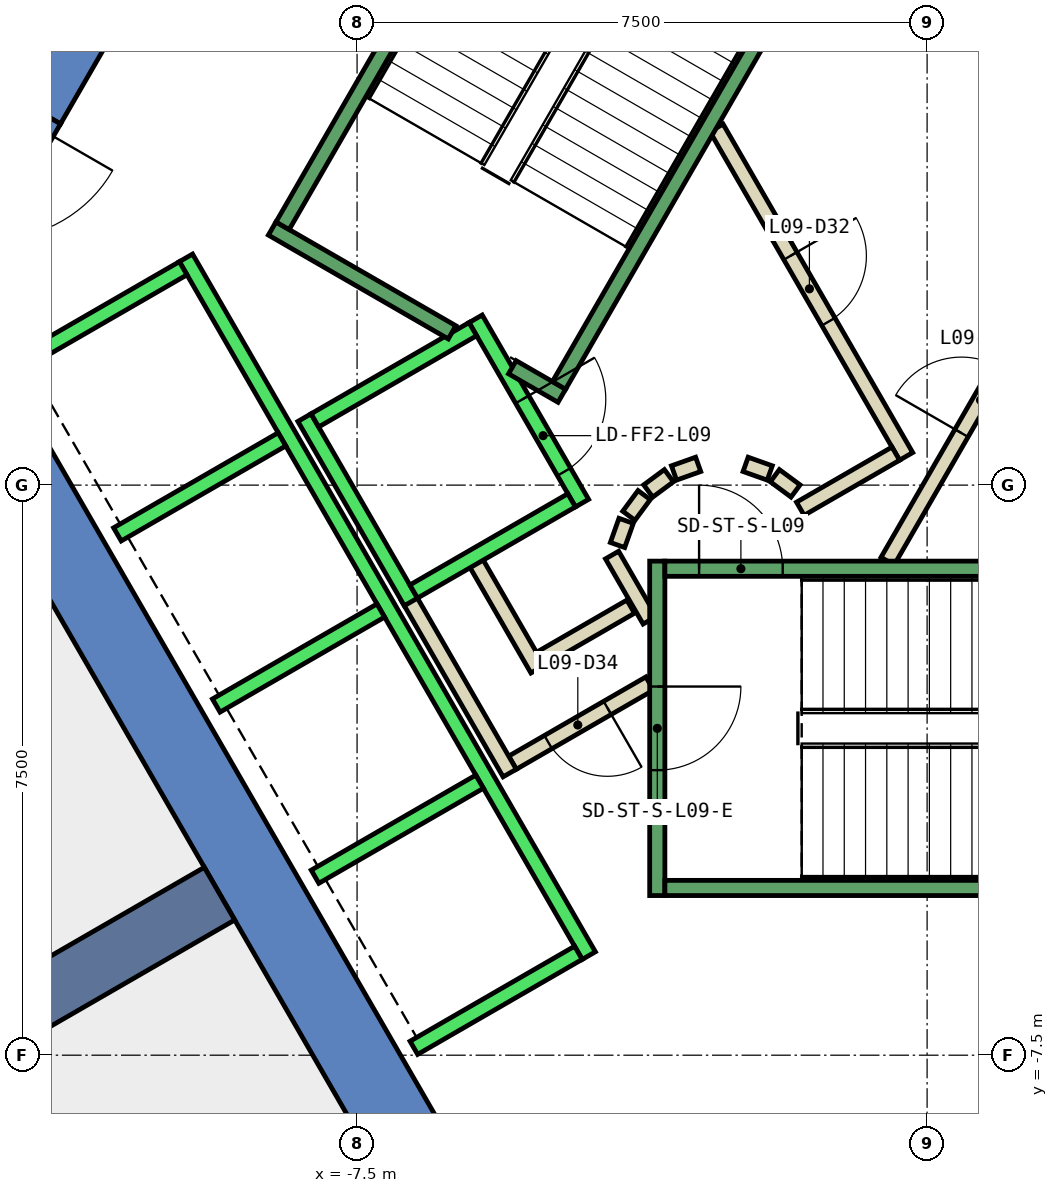
"""IFC4 building model, lengths in metres.
Left out: names, types, materials, properties, quantities, classifications, styles, units other than length and angle.
Written with IfcOpenShell. Run it as: python <this file> out.ifc"""

import sys

from ifc_helpers import new_model, si_unit, direction, frame, frame_2d, origin, place, context, subcontext, project, spatial, polyline, rectangle, outline, extrude, element, fill, save


model = new_model("IFC4")
c1 = context("Model", 3, precision=1e-05, world=origin(), true_north=direction((0.0, 1.0)))
c2 = subcontext(c1, "Body", "Model", "MODEL_VIEW")
j1 = project(units=[si_unit("LENGTHUNIT", "METRE"), si_unit("PLANEANGLEUNIT", "RADIAN")], contexts=[c1])
p1 = place(None, origin())
s1 = spatial("IfcSite", under=j1, at=p1, CompositionType="ELEMENT")
p2 = place(p1, origin())
s2 = spatial("IfcBuilding", under=s1, at=p2, CompositionType="ELEMENT")
p3 = place(p2, frame((0.0, 0.0, 47.6)))
s3 = spatial("IfcBuildingStorey", under=s2, at=p3, CompositionType="ELEMENT", Elevation=47.6)
p4 = place(p3, frame((0.0, 0.0, -0.4)))
e1 = element("IfcWall", 1, at=p4, inside=s3, PredefinedType="SHEAR", context=c2, shape_type="SweptSolid", body=[
    extrude(outline(polyline([(-12.267, 5.252), (-11.402, 4.752), (-6.351, 13.5), (-6.928, 14.5), (-12.267, 5.252)])), origin(), (0.0, 0.0, 1.0), 4.2),
])
p5 = place(p3, frame((0.0, 0.0, 3.6)))
e2 = element("IfcWall", 2, at=p5, inside=s3, PredefinedType="SHEAR", context=c2, shape_type="SweptSolid", body=[
    extrude(outline(polyline([(-13.267, 3.52), (-12.402, 3.02), (-11.402, 4.752), (-12.267, 5.252), (-13.267, 3.52)])), origin(), (0.0, 0.0, 1.0), 0.2),
])
p6 = place(p3, frame((0.0, 0.0, -0.4)))
e3 = element("IfcWall", 3, at=p6, inside=s3, PredefinedType="SHEAR", context=c2, shape_type="SweptSolid", body=[
    extrude(outline(polyline([(-13.856, 2.5), (-6.928, -9.5), (-6.351, -8.5), (-12.702, 2.5), (-13.856, 2.5)])), origin(), (0.0, 0.0, 1.0), 4.2),
])
p7 = place(p3, frame((-9.31, -5.375, -0.4), z_axis=(0.0, 0.0, 1.0), x_axis=(-0.866017533419, -0.500013631625, 0.0)))
e4 = element("IfcWall", 4, at=p7, inside=s3, PredefinedType="SHEAR", context=c2, shape_type="SweptSolid", body=[
    extrude(rectangle(XDim=9.0, YDim=0.8, at=frame_2d((4.5, 0.0))), origin(), (0.0, 0.0, 1.0), 4.2),
])
p8 = place(p3, frame((-3.9, -1.599, 0.0), z_axis=(0.0, 0.0, 1.0), x_axis=(-0.865969445389, -0.500096910261, 0.0)))
e5 = element("IfcWall", 5, at=p8, inside=s3, PredefinedType="PARTITIONING", context=c2, shape_type="SweptSolid", body=[
    extrude(rectangle(XDim=1.373, YDim=0.2, at=frame_2d((0.687, 0.0))), origin(), (0.0, 0.0, 1.0), 3.8),
])
p9 = place(p3, frame((-5.126, -2.422, 0.0), z_axis=(0.0, 0.0, 1.0), x_axis=(-0.500062241894, 0.865989465428, 0.0)))
e6 = element("IfcWall", 6, at=p9, inside=s3, PredefinedType="PARTITIONING", context=c2, shape_type="SweptSolid", body=[
    extrude(rectangle(XDim=1.7, YDim=0.2, at=frame_2d((0.85, 0.0))), origin(), (0.0, 0.0, 1.0), 3.8),
])
p10 = place(p3, frame((-3.65, -2.61, 0.0), z_axis=(0.0, 0.0, 1.0), x_axis=(-0.866072462134, -0.499918483688, 0.0)))
e7 = element("IfcWall", 7, at=p10, inside=s3, PredefinedType="PARTITIONING", context=c2, shape_type="SweptSolid", body=[
    extrude(rectangle(XDim=2.084, YDim=0.2, at=frame_2d((1.042, 0.0))), origin(), (0.0, 0.0, 1.0), 3.8),
])
p11 = place(p10, frame((0.642, 0.0, 0.0)))
e8 = element("IfcOpeningElement", 8, at=p11, cuts=e7, PredefinedType="OPENING", context=c2, shape_type="SweptSolid", body=[
    extrude(rectangle(XDim=0.9, YDim=2.1, at=frame_2d((0.45, 1.05))), frame((0.0, 0.11, 0.0), z_axis=(0.0, -1.0, 0.0), x_axis=(1.0, 0.0, 0.0)), (0.0, 0.0, 1.0), 0.22),
])
p12 = place(p3, frame((-5.492, -3.788, 0.0), z_axis=(0.0, 0.0, 1.0), x_axis=(-0.500008949224, 0.866020236886, 0.0)))
e9 = element("IfcWall", 9, at=p12, inside=s3, PredefinedType="PARTITIONING", context=c2, shape_type="SweptSolid", body=[
    extrude(rectangle(XDim=2.68, YDim=0.2, at=frame_2d((1.34, 0.0))), origin(), (0.0, 0.0, 1.0), 3.8),
])
p13 = place(p3, frame((-4.145, -0.92, 0.0), z_axis=(0.0, 0.0, 1.0), x_axis=(0.499743786207, -0.866173278362, 0.0)))
e10 = element("IfcWall", 10, at=p13, inside=s3, PredefinedType="PARTITIONING", context=c2, shape_type="SweptSolid", body=[
    extrude(rectangle(XDim=0.991, YDim=0.2, at=frame_2d((0.495, 0.0))), origin(), (0.0, 0.0, 1.0), 3.8),
])
p14 = place(p3, frame((-0.52, -1.0, 0.0), z_axis=(0.0, 0.0, 1.0), x_axis=(0.50011622646, 0.865958290007, 0.0)))
e11 = element("IfcWall", 11, at=p14, inside=s3, PredefinedType="PARTITIONING", context=c2, shape_type="SweptSolid", body=[
    extrude(rectangle(XDim=4.991, YDim=0.2, at=frame_2d((2.496, 0.0))), origin(), (0.0, 0.0, 1.0), 3.8),
])
p15 = place(p14, frame((1.945, 0.0, 0.0)))
e12 = element("IfcOpeningElement", 12, at=p15, cuts=e11, PredefinedType="OPENING", context=c2, shape_type="SweptSolid", body=[
    extrude(rectangle(XDim=1.0, YDim=2.1, at=frame_2d((0.5, 1.05))), frame((0.0, 0.11, 0.0), z_axis=(0.0, -1.0, 0.0), x_axis=(1.0, 0.0, 0.0)), (0.0, 0.0, 1.0), 0.22),
])
p16 = place(p3, frame((-2.771, 4.7, 0.0), z_axis=(0.0, 0.0, 1.0), x_axis=(0.499969479948, -0.866043023828, 0.0)))
e13 = element("IfcWall", 13, at=p16, inside=s3, PredefinedType="PARTITIONING", context=c2, shape_type="SweptSolid", body=[
    extrude(rectangle(XDim=4.99, YDim=0.2, at=frame_2d((2.495, 0.0))), origin(), (0.0, 0.0, 1.0), 3.8),
])
p17 = place(p16, frame((1.945, 0.0, 0.0)))
e14 = element("IfcOpeningElement", 14, at=p17, cuts=e13, PredefinedType="OPENING", context=c2, shape_type="SweptSolid", body=[
    extrude(rectangle(XDim=1.0, YDim=2.1, at=frame_2d((0.5, 1.05))), frame((0.0, 0.11, 0.0), z_axis=(0.0, -1.0, 0.0), x_axis=(1.0, 0.0, 0.0)), (0.0, 0.0, 1.0), 0.22),
])
p18 = place(p3, frame((-0.412, 0.414, 0.0), z_axis=(0.0, 0.0, 1.0), x_axis=(-0.866017369001, -0.500013916395, 0.0)))
e15 = element("IfcWall", 15, at=p18, inside=s3, PredefinedType="PARTITIONING", context=c2, shape_type="SweptSolid", body=[
    extrude(rectangle(XDim=1.45, YDim=0.2, at=frame_2d((0.725, 0.0))), origin(), (0.0, 0.0, 1.0), 3.8),
])
p19 = place(p3, frame((-1.731, -0.077, 0.0), z_axis=(0.0, 0.0, 1.0), x_axis=(-0.804311165252, 0.594208338422, 0.0)))
e16 = element("IfcWall", 16, at=p19, inside=s3, PredefinedType="PARTITIONING", context=c2, shape_type="SweptSolid", body=[
    extrude(rectangle(XDim=0.338, YDim=0.2, at=frame_2d((0.169, 0.0))), origin(), (0.0, 0.0, 1.0), 3.8),
])
p20 = place(p3, frame((-2.07, 0.16, 0.0), z_axis=(0.0, 0.0, 1.0), x_axis=(-0.942199461132, 0.335052496547, 0.0)))
e17 = element("IfcWall", 17, at=p20, inside=s3, PredefinedType="PARTITIONING", context=c2, shape_type="SweptSolid", body=[
    extrude(rectangle(XDim=0.337, YDim=0.2, at=frame_2d((0.169, 0.0))), origin(), (0.0, 0.0, 1.0), 3.8),
])
p21 = place(p3, frame((-3.012, 0.273, 0.0), z_axis=(0.0, 0.0, 1.0), x_axis=(-0.942280615813, -0.334824194261, 0.0)))
e18 = element("IfcWall", 18, at=p21, inside=s3, PredefinedType="PARTITIONING", context=c2, shape_type="SweptSolid", body=[
    extrude(rectangle(XDim=0.338, YDim=0.2, at=frame_2d((0.169, 0.0))), origin(), (0.0, 0.0, 1.0), 3.8),
])
p22 = place(p3, frame((-3.397, 0.124, 0.0), z_axis=(0.0, 0.0, 1.0), x_axis=(-0.804311165252, -0.594208338422, 0.0)))
e19 = element("IfcWall", 19, at=p22, inside=s3, PredefinedType="PARTITIONING", context=c2, shape_type="SweptSolid", body=[
    extrude(rectangle(XDim=0.338, YDim=0.2, at=frame_2d((0.169, 0.0))), origin(), (0.0, 0.0, 1.0), 3.8),
])
p23 = place(p3, frame((-3.723, -0.131, 0.0), z_axis=(0.0, 0.0, 1.0), x_axis=(-0.594675113454, -0.803966112121, 0.0)))
e20 = element("IfcWall", 20, at=p23, inside=s3, PredefinedType="PARTITIONING", context=c2, shape_type="SweptSolid", body=[
    extrude(rectangle(XDim=0.338, YDim=0.2, at=frame_2d((0.169, 0.0))), origin(), (0.0, 0.0, 1.0), 3.8),
])
p24 = place(p3, frame((-3.96, -0.47, 0.0), z_axis=(0.0, 0.0, 1.0), x_axis=(-0.334824194261, -0.942280615813, 0.0)))
e21 = element("IfcWall", 21, at=p24, inside=s3, PredefinedType="PARTITIONING", context=c2, shape_type="SweptSolid", body=[
    extrude(rectangle(XDim=0.338, YDim=0.2, at=frame_2d((0.169, 0.0))), origin(), (0.0, 0.0, 1.0), 3.8),
])
p25 = place(p3, frame((-5.94, 2.188, 0.0), z_axis=(0.0, 0.0, 1.0), x_axis=(0.49994636267, -0.866056369097, 0.0)))
e22 = element("IfcWall", 22, at=p25, inside=s3, PredefinedType="STANDARD", context=c2, shape_type="SweptSolid", body=[
    extrude(rectangle(XDim=2.8, YDim=0.2, at=frame_2d((1.4, 0.0))), origin(), (0.0, 0.0, 1.0), 3.8),
])
p26 = place(p25, frame((1.225, 0.0, 0.0)))
e23 = element("IfcOpeningElement", 23, at=p26, cuts=e22, PredefinedType="OPENING", context=c2, shape_type="SweptSolid", body=[
    extrude(rectangle(XDim=1.1, YDim=2.1, at=frame_2d((0.55, 1.05))), frame((0.0, 0.11, 0.0), z_axis=(0.0, -1.0, 0.0), x_axis=(1.0, 0.0, 0.0)), (0.0, 0.0, 1.0), 0.22),
])
p27 = place(p3, frame((-8.192, 0.888, 0.0), z_axis=(0.0, 0.0, 1.0), x_axis=(0.49994636267, -0.866056369097, 0.0)))
e24 = element("IfcWall", 24, at=p27, inside=s3, PredefinedType="STANDARD", context=c2, shape_type="SweptSolid", body=[
    extrude(rectangle(XDim=2.8, YDim=0.2, at=frame_2d((1.4, 0.0))), origin(), (0.0, 0.0, 1.0), 3.8),
])
for number, where, z_axis, x_axis in (
    (25, (-5.977, 2.052, 0.0), (0.0, 0.0, 1.0), (-0.866, -0.5, 0.0)),
    (26, (-4.677, -0.2, 0.0), (0.0, 0.0, 1.0), (-0.866, -0.5, 0.0)),
):
    element("IfcWall", number, at=place(p3, frame(where, z_axis=z_axis, x_axis=x_axis)), inside=s3, PredefinedType="STANDARD", context=c2, shape_type="SweptSolid", body=[
        extrude(rectangle(XDim=2.399, YDim=0.2, at=frame_2d((1.2, 0.0))), origin(), (0.0, 0.0, 1.0), 3.8),
    ])
p28 = place(p3, frame((-9.751, 2.99, 0.0), z_axis=(0.0, 0.0, 1.0), x_axis=(0.50000090737, -0.866024879913, 0.0)))
e27 = element("IfcWall", 27, at=p28, inside=s3, PredefinedType="STANDARD", context=c2, shape_type="SweptSolid", body=[
    extrude(rectangle(XDim=10.6, YDim=0.2, at=frame_2d((5.3, 0.0))), origin(), (0.0, 0.0, 1.0), 3.8),
])
p29 = place(p3, frame((-9.788, 2.853, 0.0), z_axis=(0.0, 0.0, 1.0), x_axis=(-0.865998541277, -0.500046524342, 0.0)))
e28 = element("IfcWall", 28, at=p29, inside=s3, PredefinedType="STANDARD", context=c2, shape_type="SweptSolid", body=[
    extrude(rectangle(XDim=2.5, YDim=0.2, at=frame_2d((1.25, 0.0))), origin(), (0.0, 0.0, 1.0), 3.8),
])
for number, where, z_axis, x_axis in (
    (29, (-8.488, 0.602, 0.0), (0.0, 0.0, 1.0), (-0.866, -0.5, 0.0)),
    (30, (-7.188, -1.65, 0.0), (0.0, 0.0, 1.0), (-0.866, -0.5, 0.0)),
    (31, (-5.888, -3.902, 0.0), (0.0, 0.0, 1.0), (-0.866, -0.5, 0.0)),
    (32, (-4.588, -6.153, 0.0), (0.0, 0.0, 1.0), (-0.866, -0.5, 0.0)),
):
    element("IfcWall", number, at=place(p3, frame(where, z_axis=z_axis, x_axis=x_axis)), inside=s3, PredefinedType="STANDARD", context=c2, shape_type="SweptSolid", body=[
        extrude(rectangle(XDim=2.5, YDim=0.2, at=frame_2d((1.25, 0.0))), origin(), (0.0, 0.0, 1.0), 3.8),
    ])
p30 = place(p3, frame((-3.55, -1.0, 0.0), z_axis=(0.0, 0.0, 1.0), x_axis=(0.0, -1.0, 0.0)))
e33 = element("IfcWall", 33, at=p30, inside=s3, PredefinedType="STANDARD", context=c2, shape_type="SweptSolid", body=[
    extrude(rectangle(XDim=4.4, YDim=0.2, at=frame_2d((2.2, 0.0))), origin(), (0.0, 0.0, 1.0), 3.8),
])
p31 = place(p30, frame((1.65, 0.0, 0.0)))
e34 = element("IfcOpeningElement", 34, at=p31, cuts=e33, PredefinedType="OPENING", context=c2, shape_type="SweptSolid", body=[
    extrude(rectangle(XDim=1.1, YDim=2.2, at=frame_2d((0.55, 1.1))), frame((0.0, 0.11, 0.0), z_axis=(0.0, -1.0, 0.0), x_axis=(1.0, 0.0, 0.0)), (0.0, 0.0, 1.0), 0.22),
])
p32 = place(p3, frame((-3.45, -1.1, 0.0), z_axis=(0.0, 0.0, 1.0), x_axis=(1.0, 0.0, 0.0)))
e35 = element("IfcWall", 35, at=p32, inside=s3, PredefinedType="STANDARD", context=c2, shape_type="SweptSolid", body=[
    extrude(rectangle(XDim=6.9, YDim=0.2, at=frame_2d((3.45, 0.0))), origin(), (0.0, 0.0, 1.0), 3.8),
])
p33 = place(p32, frame((0.45, 0.0, 0.0)))
e36 = element("IfcOpeningElement", 36, at=p33, cuts=e35, PredefinedType="OPENING", context=c2, shape_type="SweptSolid", body=[
    extrude(rectangle(XDim=1.1, YDim=2.2, at=frame_2d((0.55, 1.1))), frame((0.0, 0.11, 0.0), z_axis=(0.0, -1.0, 0.0), x_axis=(1.0, 0.0, 0.0)), (0.0, 0.0, 1.0), 0.22),
])
p34 = place(p3, frame((-3.45, -5.3, 0.0), z_axis=(0.0, 0.0, 1.0), x_axis=(1.0, 0.0, 0.0)))
e37 = element("IfcWall", 37, at=p34, inside=s3, PredefinedType="STANDARD", context=c2, shape_type="SweptSolid", body=[
    extrude(rectangle(XDim=6.9, YDim=0.2, at=frame_2d((3.45, 0.0))), origin(), (0.0, 0.0, 1.0), 3.8),
])
p35 = place(p3, frame((-6.25, 2.01, 0.0), z_axis=(0.0, 0.0, 1.0), x_axis=(-0.86611865017, 0.499838457731, 0.0)))
e38 = element("IfcWall", 38, at=p35, inside=s3, PredefinedType="STANDARD", context=c2, shape_type="SweptSolid", body=[
    extrude(rectangle(XDim=2.733, YDim=0.2, at=frame_2d((1.366, 0.0))), origin(), (0.0, 0.0, 1.0), 3.8),
])
p36 = place(p3, frame((-4.806, 1.176, 0.0), z_axis=(0.0, 0.0, 1.0), x_axis=(-0.866558586415, 0.499075361355, 0.0)))
e39 = element("IfcWall", 39, at=p36, inside=s3, PredefinedType="STANDARD", context=c2, shape_type="SweptSolid", body=[
    extrude(rectangle(XDim=0.751, YDim=0.2, at=frame_2d((0.376, 0.0))), origin(), (0.0, 0.0, 1.0), 3.8),
])
p37 = place(p3, frame((-1.393, 7.288, 0.0), z_axis=(0.0, 0.0, 1.0), x_axis=(-0.499963383562, -0.866046543262, 0.0)))
e40 = element("IfcWall", 40, at=p37, inside=s3, PredefinedType="STANDARD", context=c2, shape_type="SweptSolid", body=[
    extrude(rectangle(XDim=6.9, YDim=0.2, at=frame_2d((3.45, 0.0))), origin(), (0.0, 0.0, 1.0), 3.8),
])
p38 = place(p37, frame((0.45, 0.0, 0.0)))
e41 = element("IfcOpeningElement", 41, at=p38, cuts=e40, PredefinedType="OPENING", context=c2, shape_type="SweptSolid", body=[
    extrude(rectangle(XDim=1.1, YDim=2.2, at=frame_2d((0.55, 1.1))), frame((0.0, 0.11, 0.0), z_axis=(0.0, -1.0, 0.0), x_axis=(1.0, 0.0, 0.0)), (0.0, 0.0, 1.0), 0.22),
])
p39 = place(p3, frame((-5.03, 9.388, 0.0), z_axis=(0.0, 0.0, 1.0), x_axis=(-0.499978703459, -0.866037698999, 0.0)))
e42 = element("IfcWall", 42, at=p39, inside=s3, PredefinedType="STANDARD", context=c2, shape_type="SweptSolid", body=[
    extrude(rectangle(XDim=6.9, YDim=0.2, at=frame_2d((3.45, 0.0))), origin(), (0.0, 0.0, 1.0), 3.8),
])
p40 = place(p15, origin())
e43 = element("IfcDoor", 43, at=p40, inside=s3, OperationType="SINGLE_SWING_LEFT", PredefinedType="DOOR", context=c2, shape_type="SweptSolid", body=[
    extrude(rectangle(XDim=1.0, YDim=2.1, at=frame_2d((0.5, 1.05))), frame((0.0, 0.025, 0.0), z_axis=(0.0, -1.0, 0.0), x_axis=(1.0, 0.0, 0.0)), (0.0, 0.0, 1.0), 0.05),
])
fill(e12, e43)
p41 = place(p17, origin())
e44 = element("IfcDoor", 44, at=p41, inside=s3, OperationType="SINGLE_SWING_RIGHT", PredefinedType="DOOR", context=c2, shape_type="SweptSolid", body=[
    extrude(rectangle(XDim=1.0, YDim=2.1, at=frame_2d((0.5, 1.05))), frame((0.0, 0.025, 0.0), z_axis=(0.0, -1.0, 0.0), x_axis=(1.0, 0.0, 0.0)), (0.0, 0.0, 1.0), 0.05),
])
fill(e14, e44)
p42 = place(p11, origin())
e45 = element("IfcDoor", 45, at=p42, inside=s3, OperationType="SINGLE_SWING_LEFT", PredefinedType="DOOR", context=c2, shape_type="SweptSolid", body=[
    extrude(rectangle(XDim=0.9, YDim=2.1, at=frame_2d((0.45, 1.05))), frame((0.0, 0.025, 0.0), z_axis=(0.0, -1.0, 0.0), x_axis=(1.0, 0.0, 0.0)), (0.0, 0.0, 1.0), 0.05),
])
fill(e8, e45)
p43 = place(p26, origin())
e46 = element("IfcDoor", 46, at=p43, inside=s3, OperationType="SLIDING_TO_LEFT", PredefinedType="DOOR", context=c2, shape_type="SweptSolid", body=[
    extrude(rectangle(XDim=1.1, YDim=2.1, at=frame_2d((0.55, 1.05))), frame((0.0, 0.025, 0.0), z_axis=(0.0, -1.0, 0.0), x_axis=(1.0, 0.0, 0.0)), (0.0, 0.0, 1.0), 0.05),
])
fill(e23, e46)
p44 = place(p33, origin())
e47 = element("IfcDoor", 47, at=p44, inside=s3, OperationType="SINGLE_SWING_LEFT", PredefinedType="DOOR", context=c2, shape_type="SweptSolid", body=[
    extrude(rectangle(XDim=1.1, YDim=2.2, at=frame_2d((0.55, 1.1))), frame((0.0, 0.025, 0.0), z_axis=(0.0, -1.0, 0.0), x_axis=(1.0, 0.0, 0.0)), (0.0, 0.0, 1.0), 0.05),
])
fill(e36, e47)
p45 = place(p31, origin())
e48 = element("IfcDoor", 48, at=p45, inside=s3, OperationType="SINGLE_SWING_LEFT", PredefinedType="DOOR", context=c2, shape_type="SweptSolid", body=[
    extrude(rectangle(XDim=1.1, YDim=2.2, at=frame_2d((0.55, 1.1))), frame((0.0, 0.025, 0.0), z_axis=(0.0, -1.0, 0.0), x_axis=(1.0, 0.0, 0.0)), (0.0, 0.0, 1.0), 0.05),
])
fill(e34, e48)
save(model, sys.argv[1])
